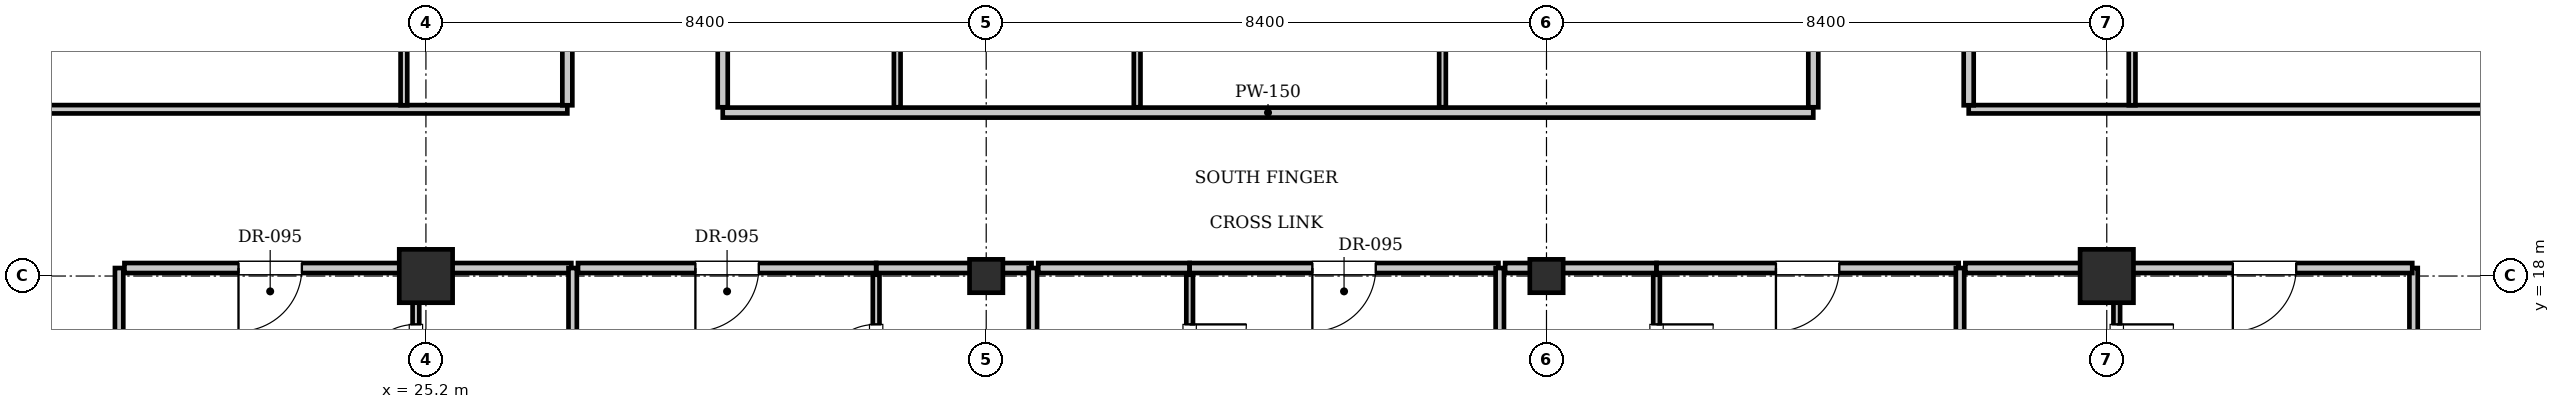
"""IFC4 building model, lengths in metres.
Left out: names, types, materials, properties, quantities, classifications, styles, units other than length and angle.
Written with IfcOpenShell. Run it as: python <this file> out.ifc"""

import sys

from ifc_helpers import new_model, si_unit, direction, frame, frame_2d, origin, origin_2d, place, context, subcontext, project, spatial, rectangle, i_section, extrude, element, fill, save


model = new_model("IFC4")
c1 = context("Model", 3, precision=1e-05, world=origin(), true_north=direction((0.0, 1.0)))
c2 = subcontext(c1, "Body", "Model", "MODEL_VIEW")
j1 = project(units=[si_unit("LENGTHUNIT", "METRE"), si_unit("PLANEANGLEUNIT", "RADIAN")], contexts=[c1])
p1 = place(None, origin())
s1 = spatial("IfcSite", under=j1, at=p1, CompositionType="ELEMENT")
p2 = place(p1, origin())
s2 = spatial("IfcBuilding", under=s1, at=p2, CompositionType="ELEMENT")
p3 = place(p2, frame((0.0, 0.0, 266.35)))
s3 = spatial("IfcBuildingStorey", under=s2, at=p3, CompositionType="ELEMENT", Elevation=266.35)
for number, where, z_axis, x_axis in (
    (1, (25.2, 18.0, 0.0), (0.0, 0.0, 1.0), (1.0, 0.0, 0.0)),
    (2, (50.4, 18.0, 0.0), (0.0, 0.0, 1.0), (1.0, 0.0, 0.0)),
):
    element("IfcColumn", number, at=place(p3, frame(where, z_axis=z_axis, x_axis=x_axis)), inside=s3, PredefinedType="COLUMN", context=c2, shape_type="SweptSolid", body=[
        extrude(rectangle(XDim=0.8, YDim=0.8, at=origin_2d()), origin(), (0.0, 0.0, 1.0), 3.85),
    ])
for number, where, z_axis, x_axis in (
    (3, (33.6, 18.0, 0.0), (0.0, 0.0, 1.0), (1.0, 0.0, 0.0)),
    (4, (42.0, 18.0, 0.0), (0.0, 0.0, 1.0), (1.0, 0.0, 0.0)),
):
    element("IfcColumn", number, at=place(p3, frame(where, z_axis=z_axis, x_axis=x_axis)), inside=s3, PredefinedType="COLUMN", context=c2, shape_type="SweptSolid", body=[
        extrude(i_section(OverallWidth=0.5, OverallDepth=0.5, WebThickness=0.022, FlangeThickness=0.032, at=origin_2d()), origin(), (0.0, 0.0, 1.0), 3.85),
    ])
p4 = place(p3, frame((29.65, 20.45, 0.0), z_axis=(0.0, 0.0, 1.0), x_axis=(1.0, 0.0, 0.0)))
e5 = element("IfcWall", 5, at=p4, inside=s3, PredefinedType="PARTITIONING", context=c2, shape_type="SweptSolid", body=[
    extrude(rectangle(XDim=16.35, YDim=0.15, at=frame_2d((8.175, 0.0))), origin(), (0.0, 0.0, 1.0), 3.61),
])
for number, where, z_axis, x_axis in (
    (6, (29.65, 20.53, 0.0), (0.0, 0.0, 1.0), (0.0, 1.0, 0.0)),
    (7, (46.0, 20.53, 0.0), (0.0, 0.0, 1.0), (0.0, 1.0, 0.0)),
):
    element("IfcWall", number, at=place(p3, frame(where, z_axis=z_axis, x_axis=x_axis)), inside=s3, PredefinedType="PARTITIONING", context=c2, shape_type="SweptSolid", body=[
        extrude(rectangle(XDim=9.29, YDim=0.15, at=frame_2d((4.645, 0.0))), origin(), (0.0, 0.0, 1.0), 3.61),
    ])
for number, where, z_axis, x_axis in (
    (8, (32.266, 20.53, 0.0), (0.0, 0.0, 1.0), (0.0, 1.0, 0.0)),
    (9, (35.863, 20.53, 0.0), (0.0, 0.0, 1.0), (0.0, 1.0, 0.0)),
    (10, (40.441, 20.53, 0.0), (0.0, 0.0, 1.0), (0.0, 1.0, 0.0)),
):
    element("IfcWall", number, at=place(p3, frame(where, z_axis=z_axis, x_axis=x_axis)), inside=s3, PredefinedType="PARTITIONING", context=c2, shape_type="SweptSolid", body=[
        extrude(rectangle(XDim=9.29, YDim=0.1, at=frame_2d((4.645, 0.0))), origin(), (0.0, 0.0, 1.0), 3.61),
    ])
for number, where, z_axis, x_axis in (
    (11, (20.6, 14.4, 0.0), (0.0, 0.0, 1.0), (0.0, 1.0, 0.0)),
    (12, (55.0, 14.4, 0.0), (0.0, 0.0, 1.0), (0.0, 1.0, 0.0)),
):
    element("IfcWall", number, at=place(p3, frame(where, z_axis=z_axis, x_axis=x_axis)), inside=s3, PredefinedType="PARTITIONING", context=c2, shape_type="SweptSolid", body=[
        extrude(rectangle(XDim=3.72, YDim=0.125, at=frame_2d((1.86, 0.0))), origin(), (0.0, 0.0, 1.0), 3.61),
    ])
p5 = place(p3, frame((25.05, 18.12, 0.0), z_axis=(0.0, 0.0, 1.0), x_axis=(1.0, 0.0, 0.0)))
e13 = element("IfcWall", 13, at=p5, inside=s3, PredefinedType="PARTITIONING", context=c2, shape_type="SweptSolid", body=[
    extrude(rectangle(XDim=2.33, YDim=0.15, at=frame_2d((1.165, 0.0))), origin(), (0.0, 0.0, 1.0), 3.077),
])
p6 = place(p3, frame((25.05, 15.68, 0.0), z_axis=(0.0, 0.0, 1.0), x_axis=(0.0, 1.0, 0.0)))
e14 = element("IfcWall", 14, at=p6, inside=s3, PredefinedType="PARTITIONING", context=c2, shape_type="SweptSolid", body=[
    extrude(rectangle(XDim=2.34, YDim=0.1, at=frame_2d((1.17, 0.0))), origin(), (0.0, 0.0, 1.0), 3.61),
])
p7 = place(p6, frame((0.745, 0.0, 0.0)))
e15 = element("IfcOpeningElement", 15, at=p7, cuts=e14, PredefinedType="OPENING", context=c2, shape_type="SweptSolid", body=[
    extrude(rectangle(XDim=0.85, YDim=2.1, at=frame_2d((0.425, 1.05))), frame((0.0, 0.06, 0.0), z_axis=(0.0, -1.0, 0.0), x_axis=(1.0, 0.0, 0.0)), (0.0, 0.0, 1.0), 0.12),
])
p8 = place(p3, frame((20.68, 18.12, 0.0), z_axis=(0.0, 0.0, 1.0), x_axis=(1.0, 0.0, 0.0)))
e16 = element("IfcWall", 16, at=p8, inside=s3, PredefinedType="PARTITIONING", context=c2, shape_type="SweptSolid", body=[
    extrude(rectangle(XDim=4.37, YDim=0.15, at=frame_2d((2.185, 0.0))), origin(), (0.0, 0.0, 1.0), 3.077),
])
p9 = place(p8, frame((1.71, 0.0, 0.0)))
e17 = element("IfcOpeningElement", 17, at=p9, cuts=e16, PredefinedType="OPENING", context=c2, shape_type="SweptSolid", body=[
    extrude(rectangle(XDim=0.95, YDim=2.15, at=frame_2d((0.475, 1.075))), frame((0.0, 0.085, 0.0), z_axis=(0.0, -1.0, 0.0), x_axis=(1.0, 0.0, 0.0)), (0.0, 0.0, 1.0), 0.17),
])
p10 = place(p3, frame((27.4, 9.3, 0.0), z_axis=(0.0, 0.0, 1.0), x_axis=(0.0, 1.0, 0.0)))
e18 = element("IfcWall", 18, at=p10, inside=s3, PredefinedType="PARTITIONING", context=c2, shape_type="SweptSolid", body=[
    extrude(rectangle(XDim=8.82, YDim=0.125, at=frame_2d((4.41, 0.0))), origin(), (0.0, 0.0, 1.0), 3.61),
])
p11 = place(p3, frame((31.95, 18.12, 0.0), z_axis=(0.0, 0.0, 1.0), x_axis=(1.0, 0.0, 0.0)))
e19 = element("IfcWall", 19, at=p11, inside=s3, PredefinedType="PARTITIONING", context=c2, shape_type="SweptSolid", body=[
    extrude(rectangle(XDim=2.33, YDim=0.15, at=frame_2d((1.165, 0.0))), origin(), (0.0, 0.0, 1.0), 3.077),
])
p12 = place(p3, frame((31.95, 15.68, 0.0), z_axis=(0.0, 0.0, 1.0), x_axis=(0.0, 1.0, 0.0)))
e20 = element("IfcWall", 20, at=p12, inside=s3, PredefinedType="PARTITIONING", context=c2, shape_type="SweptSolid", body=[
    extrude(rectangle(XDim=2.34, YDim=0.1, at=frame_2d((1.17, 0.0))), origin(), (0.0, 0.0, 1.0), 3.61),
])
p13 = place(p12, frame((0.745, 0.0, 0.0)))
e21 = element("IfcOpeningElement", 21, at=p13, cuts=e20, PredefinedType="OPENING", context=c2, shape_type="SweptSolid", body=[
    extrude(rectangle(XDim=0.85, YDim=2.1, at=frame_2d((0.425, 1.05))), frame((0.0, 0.06, 0.0), z_axis=(0.0, -1.0, 0.0), x_axis=(1.0, 0.0, 0.0)), (0.0, 0.0, 1.0), 0.12),
])
p14 = place(p3, frame((27.48, 18.12, 0.0), z_axis=(0.0, 0.0, 1.0), x_axis=(1.0, 0.0, 0.0)))
e22 = element("IfcWall", 22, at=p14, inside=s3, PredefinedType="PARTITIONING", context=c2, shape_type="SweptSolid", body=[
    extrude(rectangle(XDim=4.47, YDim=0.15, at=frame_2d((2.235, 0.0))), origin(), (0.0, 0.0, 1.0), 3.077),
])
p15 = place(p14, frame((1.76, 0.0, 0.0)))
e23 = element("IfcOpeningElement", 23, at=p15, cuts=e22, PredefinedType="OPENING", context=c2, shape_type="SweptSolid", body=[
    extrude(rectangle(XDim=0.95, YDim=2.15, at=frame_2d((0.475, 1.075))), frame((0.0, 0.085, 0.0), z_axis=(0.0, -1.0, 0.0), x_axis=(1.0, 0.0, 0.0)), (0.0, 0.0, 1.0), 0.17),
])
p16 = place(p3, frame((34.3, 9.3, 0.0), z_axis=(0.0, 0.0, 1.0), x_axis=(0.0, 1.0, 0.0)))
e24 = element("IfcWall", 24, at=p16, inside=s3, PredefinedType="PARTITIONING", context=c2, shape_type="SweptSolid", body=[
    extrude(rectangle(XDim=8.82, YDim=0.125, at=frame_2d((4.41, 0.0))), origin(), (0.0, 0.0, 1.0), 3.61),
])
p17 = place(p3, frame((34.38, 18.12, 0.0), z_axis=(0.0, 0.0, 1.0), x_axis=(1.0, 0.0, 0.0)))
e25 = element("IfcWall", 25, at=p17, inside=s3, PredefinedType="PARTITIONING", context=c2, shape_type="SweptSolid", body=[
    extrude(rectangle(XDim=2.27, YDim=0.15, at=frame_2d((1.135, 0.0))), origin(), (0.0, 0.0, 1.0), 3.077),
])
p18 = place(p3, frame((36.65, 15.68, 0.0), z_axis=(0.0, 0.0, 1.0), x_axis=(0.0, 1.0, 0.0)))
e26 = element("IfcWall", 26, at=p18, inside=s3, PredefinedType="PARTITIONING", context=c2, shape_type="SweptSolid", body=[
    extrude(rectangle(XDim=2.34, YDim=0.1, at=frame_2d((1.17, 0.0))), origin(), (0.0, 0.0, 1.0), 3.61),
])
p19 = place(p18, frame((0.745, 0.0, 0.0)))
e27 = element("IfcOpeningElement", 27, at=p19, cuts=e26, PredefinedType="OPENING", context=c2, shape_type="SweptSolid", body=[
    extrude(rectangle(XDim=0.85, YDim=2.1, at=frame_2d((0.425, 1.05))), frame((0.0, 0.06, 0.0), z_axis=(0.0, -1.0, 0.0), x_axis=(1.0, 0.0, 0.0)), (0.0, 0.0, 1.0), 0.12),
])
p20 = place(p3, frame((36.65, 18.12, 0.0), z_axis=(0.0, 0.0, 1.0), x_axis=(1.0, 0.0, 0.0)))
e28 = element("IfcWall", 28, at=p20, inside=s3, PredefinedType="PARTITIONING", context=c2, shape_type="SweptSolid", body=[
    extrude(rectangle(XDim=4.63, YDim=0.15, at=frame_2d((2.315, 0.0))), origin(), (0.0, 0.0, 1.0), 3.077),
])
p21 = place(p20, frame((1.84, 0.0, 0.0)))
e29 = element("IfcOpeningElement", 29, at=p21, cuts=e28, PredefinedType="OPENING", context=c2, shape_type="SweptSolid", body=[
    extrude(rectangle(XDim=0.95, YDim=2.15, at=frame_2d((0.475, 1.075))), frame((0.0, 0.085, 0.0), z_axis=(0.0, -1.0, 0.0), x_axis=(1.0, 0.0, 0.0)), (0.0, 0.0, 1.0), 0.17),
])
p22 = place(p3, frame((41.3, 9.3, 0.0), z_axis=(0.0, 0.0, 1.0), x_axis=(0.0, 1.0, 0.0)))
e30 = element("IfcWall", 30, at=p22, inside=s3, PredefinedType="PARTITIONING", context=c2, shape_type="SweptSolid", body=[
    extrude(rectangle(XDim=8.82, YDim=0.125, at=frame_2d((4.41, 0.0))), origin(), (0.0, 0.0, 1.0), 3.61),
])
p23 = place(p3, frame((41.38, 18.12, 0.0), z_axis=(0.0, 0.0, 1.0), x_axis=(1.0, 0.0, 0.0)))
e31 = element("IfcWall", 31, at=p23, inside=s3, PredefinedType="PARTITIONING", context=c2, shape_type="SweptSolid", body=[
    extrude(rectangle(XDim=2.27, YDim=0.15, at=frame_2d((1.135, 0.0))), origin(), (0.0, 0.0, 1.0), 3.077),
])
p24 = place(p3, frame((43.65, 15.68, 0.0), z_axis=(0.0, 0.0, 1.0), x_axis=(0.0, 1.0, 0.0)))
e32 = element("IfcWall", 32, at=p24, inside=s3, PredefinedType="PARTITIONING", context=c2, shape_type="SweptSolid", body=[
    extrude(rectangle(XDim=2.34, YDim=0.1, at=frame_2d((1.17, 0.0))), origin(), (0.0, 0.0, 1.0), 3.61),
])
p25 = place(p24, frame((0.745, 0.0, 0.0)))
e33 = element("IfcOpeningElement", 33, at=p25, cuts=e32, PredefinedType="OPENING", context=c2, shape_type="SweptSolid", body=[
    extrude(rectangle(XDim=0.85, YDim=2.1, at=frame_2d((0.425, 1.05))), frame((0.0, 0.06, 0.0), z_axis=(0.0, -1.0, 0.0), x_axis=(1.0, 0.0, 0.0)), (0.0, 0.0, 1.0), 0.12),
])
p26 = place(p3, frame((43.65, 18.12, 0.0), z_axis=(0.0, 0.0, 1.0), x_axis=(1.0, 0.0, 0.0)))
e34 = element("IfcWall", 34, at=p26, inside=s3, PredefinedType="PARTITIONING", context=c2, shape_type="SweptSolid", body=[
    extrude(rectangle(XDim=4.53, YDim=0.15, at=frame_2d((2.265, 0.0))), origin(), (0.0, 0.0, 1.0), 3.077),
])
p27 = place(p26, frame((1.79, 0.0, 0.0)))
e35 = element("IfcOpeningElement", 35, at=p27, cuts=e34, PredefinedType="OPENING", context=c2, shape_type="SweptSolid", body=[
    extrude(rectangle(XDim=0.95, YDim=2.15, at=frame_2d((0.475, 1.075))), frame((0.0, 0.085, 0.0), z_axis=(0.0, -1.0, 0.0), x_axis=(1.0, 0.0, 0.0)), (0.0, 0.0, 1.0), 0.17),
])
p28 = place(p3, frame((48.2, 9.3, 0.0), z_axis=(0.0, 0.0, 1.0), x_axis=(0.0, 1.0, 0.0)))
e36 = element("IfcWall", 36, at=p28, inside=s3, PredefinedType="PARTITIONING", context=c2, shape_type="SweptSolid", body=[
    extrude(rectangle(XDim=8.82, YDim=0.125, at=frame_2d((4.41, 0.0))), origin(), (0.0, 0.0, 1.0), 3.61),
])
p29 = place(p3, frame((48.28, 18.12, 0.0), z_axis=(0.0, 0.0, 1.0), x_axis=(1.0, 0.0, 0.0)))
e37 = element("IfcWall", 37, at=p29, inside=s3, PredefinedType="PARTITIONING", context=c2, shape_type="SweptSolid", body=[
    extrude(rectangle(XDim=2.27, YDim=0.15, at=frame_2d((1.135, 0.0))), origin(), (0.0, 0.0, 1.0), 3.077),
])
p30 = place(p3, frame((50.55, 15.68, 0.0), z_axis=(0.0, 0.0, 1.0), x_axis=(0.0, 1.0, 0.0)))
e38 = element("IfcWall", 38, at=p30, inside=s3, PredefinedType="PARTITIONING", context=c2, shape_type="SweptSolid", body=[
    extrude(rectangle(XDim=2.34, YDim=0.1, at=frame_2d((1.17, 0.0))), origin(), (0.0, 0.0, 1.0), 3.61),
])
p31 = place(p30, frame((0.745, 0.0, 0.0)))
e39 = element("IfcOpeningElement", 39, at=p31, cuts=e38, PredefinedType="OPENING", context=c2, shape_type="SweptSolid", body=[
    extrude(rectangle(XDim=0.85, YDim=2.1, at=frame_2d((0.425, 1.05))), frame((0.0, 0.06, 0.0), z_axis=(0.0, -1.0, 0.0), x_axis=(1.0, 0.0, 0.0)), (0.0, 0.0, 1.0), 0.12),
])
p32 = place(p3, frame((50.55, 18.12, 0.0), z_axis=(0.0, 0.0, 1.0), x_axis=(1.0, 0.0, 0.0)))
e40 = element("IfcWall", 40, at=p32, inside=s3, PredefinedType="PARTITIONING", context=c2, shape_type="SweptSolid", body=[
    extrude(rectangle(XDim=4.43, YDim=0.15, at=frame_2d((2.215, 0.0))), origin(), (0.0, 0.0, 1.0), 3.077),
])
p33 = place(p32, frame((1.74, 0.0, 0.0)))
e41 = element("IfcOpeningElement", 41, at=p33, cuts=e40, PredefinedType="OPENING", context=c2, shape_type="SweptSolid", body=[
    extrude(rectangle(XDim=0.95, YDim=2.15, at=frame_2d((0.475, 1.075))), frame((0.0, 0.085, 0.0), z_axis=(0.0, -1.0, 0.0), x_axis=(1.0, 0.0, 0.0)), (0.0, 0.0, 1.0), 0.17),
])
p34 = place(p3, frame((15.5, 20.5, 0.0), z_axis=(0.0, 0.0, 1.0), x_axis=(1.0, 0.0, 0.0)))
e42 = element("IfcWall", 42, at=p34, inside=s3, PredefinedType="PARTITIONING", context=c2, shape_type="SweptSolid", body=[
    extrude(rectangle(XDim=11.82, YDim=0.125, at=frame_2d((5.91, 0.0))), origin(), (0.0, 0.0, 1.0), 3.61),
])
p35 = place(p3, frame((48.33, 20.5, 0.0), z_axis=(0.0, 0.0, 1.0), x_axis=(1.0, 0.0, 0.0)))
e43 = element("IfcWall", 43, at=p35, inside=s3, PredefinedType="PARTITIONING", context=c2, shape_type="SweptSolid", body=[
    extrude(rectangle(XDim=11.77, YDim=0.125, at=frame_2d((5.885, 0.0))), origin(), (0.0, 0.0, 1.0), 3.61),
])
p36 = place(p3, frame((27.32, 20.56, 0.0), z_axis=(0.0, 0.0, 1.0), x_axis=(0.0, 1.0, 0.0)))
e44 = element("IfcWall", 44, at=p36, inside=s3, PredefinedType="PARTITIONING", context=c2, shape_type="SweptSolid", body=[
    extrude(rectangle(XDim=2.08, YDim=0.15, at=frame_2d((1.04, 0.0))), origin(), (0.0, 0.0, 1.0), 3.61),
])
p37 = place(p3, frame((24.87, 20.56, 0.0), z_axis=(0.0, 0.0, 1.0), x_axis=(0.0, 1.0, 0.0)))
e45 = element("IfcWall", 45, at=p37, inside=s3, PredefinedType="PARTITIONING", context=c2, shape_type="SweptSolid", body=[
    extrude(rectangle(XDim=2.08, YDim=0.1, at=frame_2d((1.04, 0.0))), origin(), (0.0, 0.0, 1.0), 3.61),
])
p38 = place(p3, frame((48.33, 20.56, 0.0), z_axis=(0.0, 0.0, 1.0), x_axis=(0.0, 1.0, 0.0)))
e46 = element("IfcWall", 46, at=p38, inside=s3, PredefinedType="PARTITIONING", context=c2, shape_type="SweptSolid", body=[
    extrude(rectangle(XDim=2.08, YDim=0.15, at=frame_2d((1.04, 0.0))), origin(), (0.0, 0.0, 1.0), 3.61),
])
p39 = place(p3, frame((50.78, 20.56, 0.0), z_axis=(0.0, 0.0, 1.0), x_axis=(0.0, 1.0, 0.0)))
e47 = element("IfcWall", 47, at=p39, inside=s3, PredefinedType="PARTITIONING", context=c2, shape_type="SweptSolid", body=[
    extrude(rectangle(XDim=2.08, YDim=0.1, at=frame_2d((1.04, 0.0))), origin(), (0.0, 0.0, 1.0), 3.61),
])
p40 = place(p7, origin())
e48 = element("IfcDoor", 48, at=p40, inside=s3, OperationType="SINGLE_SWING_LEFT", PredefinedType="DOOR", context=c2, shape_type="SweptSolid", body=[
    extrude(rectangle(XDim=0.85, YDim=2.1, at=frame_2d((0.425, 1.05))), frame((0.0, 0.025, 0.0), z_axis=(0.0, -1.0, 0.0), x_axis=(1.0, 0.0, 0.0)), (0.0, 0.0, 1.0), 0.05),
])
fill(e15, e48)
p41 = place(p9, frame((0.95, 0.0, 0.0), z_axis=(0.0, 0.0, 1.0), x_axis=(-1.0, 0.0, 0.0)))
e49 = element("IfcDoor", 49, at=p41, inside=s3, OperationType="SINGLE_SWING_RIGHT", PredefinedType="DOOR", context=c2, shape_type="SweptSolid", body=[
    extrude(rectangle(XDim=0.95, YDim=2.15, at=frame_2d((0.475, 1.075))), frame((0.0, 0.025, 0.0), z_axis=(0.0, -1.0, 0.0), x_axis=(1.0, 0.0, 0.0)), (0.0, 0.0, 1.0), 0.05),
])
fill(e17, e49)
p42 = place(p13, origin())
e50 = element("IfcDoor", 50, at=p42, inside=s3, OperationType="SINGLE_SWING_LEFT", PredefinedType="DOOR", context=c2, shape_type="SweptSolid", body=[
    extrude(rectangle(XDim=0.85, YDim=2.1, at=frame_2d((0.425, 1.05))), frame((0.0, 0.025, 0.0), z_axis=(0.0, -1.0, 0.0), x_axis=(1.0, 0.0, 0.0)), (0.0, 0.0, 1.0), 0.05),
])
fill(e21, e50)
p43 = place(p15, frame((0.95, 0.0, 0.0), z_axis=(0.0, 0.0, 1.0), x_axis=(-1.0, 0.0, 0.0)))
e51 = element("IfcDoor", 51, at=p43, inside=s3, OperationType="SINGLE_SWING_RIGHT", PredefinedType="DOOR", context=c2, shape_type="SweptSolid", body=[
    extrude(rectangle(XDim=0.95, YDim=2.15, at=frame_2d((0.475, 1.075))), frame((0.0, 0.025, 0.0), z_axis=(0.0, -1.0, 0.0), x_axis=(1.0, 0.0, 0.0)), (0.0, 0.0, 1.0), 0.05),
])
fill(e23, e51)
p44 = place(p19, frame((0.85, 0.0, 0.0), z_axis=(0.0, 0.0, 1.0), x_axis=(-1.0, 0.0, 0.0)))
e52 = element("IfcDoor", 52, at=p44, inside=s3, OperationType="SINGLE_SWING_LEFT", PredefinedType="DOOR", context=c2, shape_type="SweptSolid", body=[
    extrude(rectangle(XDim=0.85, YDim=2.1, at=frame_2d((0.425, 1.05))), frame((0.0, 0.025, 0.0), z_axis=(0.0, -1.0, 0.0), x_axis=(1.0, 0.0, 0.0)), (0.0, 0.0, 1.0), 0.05),
])
fill(e27, e52)
p45 = place(p21, frame((0.95, 0.0, 0.0), z_axis=(0.0, 0.0, 1.0), x_axis=(-1.0, 0.0, 0.0)))
e53 = element("IfcDoor", 53, at=p45, inside=s3, OperationType="SINGLE_SWING_RIGHT", PredefinedType="DOOR", context=c2, shape_type="SweptSolid", body=[
    extrude(rectangle(XDim=0.95, YDim=2.15, at=frame_2d((0.475, 1.075))), frame((0.0, 0.025, 0.0), z_axis=(0.0, -1.0, 0.0), x_axis=(1.0, 0.0, 0.0)), (0.0, 0.0, 1.0), 0.05),
])
fill(e29, e53)
p46 = place(p25, frame((0.85, 0.0, 0.0), z_axis=(0.0, 0.0, 1.0), x_axis=(-1.0, 0.0, 0.0)))
e54 = element("IfcDoor", 54, at=p46, inside=s3, OperationType="SINGLE_SWING_LEFT", PredefinedType="DOOR", context=c2, shape_type="SweptSolid", body=[
    extrude(rectangle(XDim=0.85, YDim=2.1, at=frame_2d((0.425, 1.05))), frame((0.0, 0.025, 0.0), z_axis=(0.0, -1.0, 0.0), x_axis=(1.0, 0.0, 0.0)), (0.0, 0.0, 1.0), 0.05),
])
fill(e33, e54)
p47 = place(p27, frame((0.95, 0.0, 0.0), z_axis=(0.0, 0.0, 1.0), x_axis=(-1.0, 0.0, 0.0)))
e55 = element("IfcDoor", 55, at=p47, inside=s3, OperationType="SINGLE_SWING_RIGHT", PredefinedType="DOOR", context=c2, shape_type="SweptSolid", body=[
    extrude(rectangle(XDim=0.95, YDim=2.15, at=frame_2d((0.475, 1.075))), frame((0.0, 0.025, 0.0), z_axis=(0.0, -1.0, 0.0), x_axis=(1.0, 0.0, 0.0)), (0.0, 0.0, 1.0), 0.05),
])
fill(e35, e55)
p48 = place(p31, frame((0.85, 0.0, 0.0), z_axis=(0.0, 0.0, 1.0), x_axis=(-1.0, 0.0, 0.0)))
e56 = element("IfcDoor", 56, at=p48, inside=s3, OperationType="SINGLE_SWING_LEFT", PredefinedType="DOOR", context=c2, shape_type="SweptSolid", body=[
    extrude(rectangle(XDim=0.85, YDim=2.1, at=frame_2d((0.425, 1.05))), frame((0.0, 0.025, 0.0), z_axis=(0.0, -1.0, 0.0), x_axis=(1.0, 0.0, 0.0)), (0.0, 0.0, 1.0), 0.05),
])
fill(e39, e56)
p49 = place(p33, frame((0.95, 0.0, 0.0), z_axis=(0.0, 0.0, 1.0), x_axis=(-1.0, 0.0, 0.0)))
e57 = element("IfcDoor", 57, at=p49, inside=s3, OperationType="SINGLE_SWING_RIGHT", PredefinedType="DOOR", context=c2, shape_type="SweptSolid", body=[
    extrude(rectangle(XDim=0.95, YDim=2.15, at=frame_2d((0.475, 1.075))), frame((0.0, 0.025, 0.0), z_axis=(0.0, -1.0, 0.0), x_axis=(1.0, 0.0, 0.0)), (0.0, 0.0, 1.0), 0.05),
])
fill(e41, e57)
save(model, sys.argv[1])
